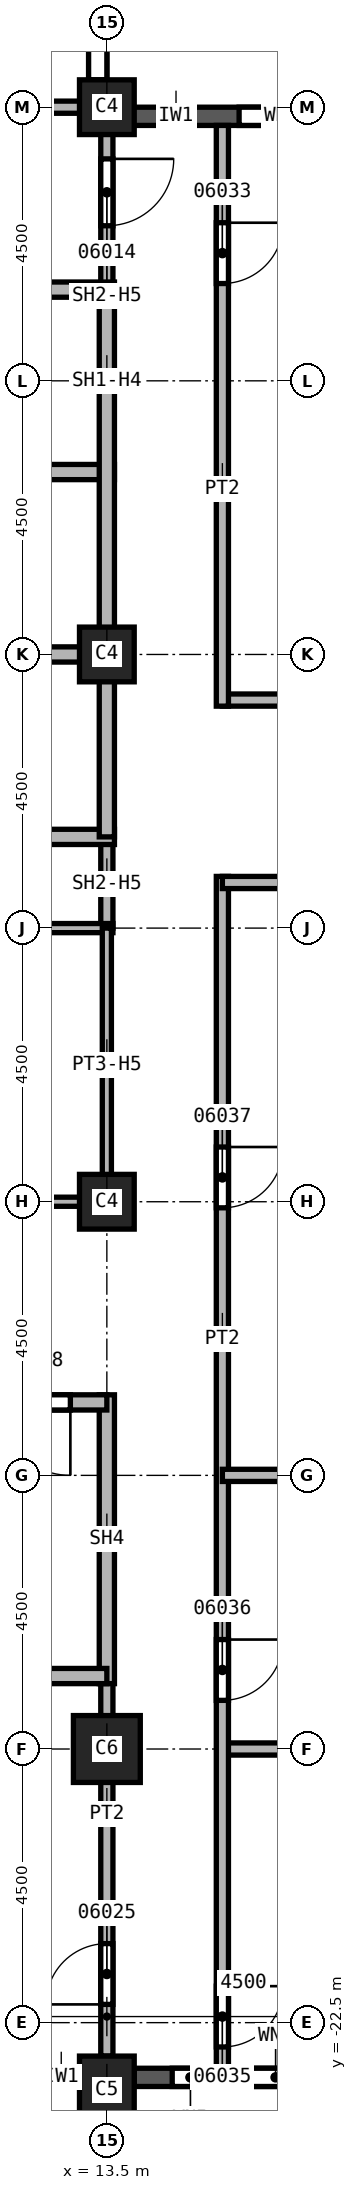
"""IFC4 building model, lengths in metres.
Left out: names, types, materials, properties, quantities, classifications, styles, units other than length and angle.
Written with IfcOpenShell. Run it as: python <this file> out.ifc"""

import sys

from ifc_helpers import new_model, si_unit, direction, frame, frame_2d, origin, origin_2d, place, context, subcontext, project, spatial, rectangle, extrude, element, fill, save


model = new_model("IFC4")
c1 = context("Model", 3, precision=1e-05, world=origin(), true_north=direction((0.0, 1.0)))
c2 = subcontext(c1, "Body", "Model", "MODEL_VIEW")
j1 = project(units=[si_unit("LENGTHUNIT", "METRE"), si_unit("PLANEANGLEUNIT", "RADIAN")], contexts=[c1])
p1 = place(None, origin())
s1 = spatial("IfcSite", under=j1, at=p1, CompositionType="ELEMENT")
p2 = place(p1, origin())
s2 = spatial("IfcBuilding", under=s1, at=p2, CompositionType="ELEMENT")
p3 = place(p2, frame((0.0, 0.0, 126.0)))
s3 = spatial("IfcBuildingStorey", under=s2, at=p3, CompositionType="ELEMENT", Elevation=126.0)
p4 = place(p3, frame((13.5, -18.0, 0.0), z_axis=(0.0, 0.0, 1.0), x_axis=(1.0, 0.0, 0.0)))
e1 = element("IfcColumn", 1, at=p4, inside=s3, PredefinedType="COLUMN", context=c2, shape_type="SweptSolid", body=[
    extrude(rectangle(XDim=1.1, YDim=1.1, at=origin_2d()), origin(), (0.0, 0.0, 1.0), 3.7),
])
for number, where, z_axis, x_axis in (
    (2, (13.5, 0.0, 0.0), (0.0, 0.0, 1.0), (1.0, 0.0, 0.0)),
    (3, (13.5, 9.0, 0.0), (0.0, 0.0, 1.0), (1.0, 0.0, 0.0)),
    (4, (13.5, -9.0, 0.0), (0.0, 0.0, 1.0), (1.0, 0.0, 0.0)),
):
    element("IfcColumn", number, at=place(p3, frame(where, z_axis=z_axis, x_axis=x_axis)), inside=s3, PredefinedType="COLUMN", context=c2, shape_type="SweptSolid", body=[
        extrude(rectangle(XDim=0.9, YDim=0.9, at=origin_2d()), origin(), (0.0, 0.0, 1.0), 3.7),
    ])
p5 = place(p3, frame((13.5, -23.6, 0.0), z_axis=(0.0, 0.0, 1.0), x_axis=(1.0, 0.0, 0.0)))
e5 = element("IfcColumn", 5, at=p5, inside=s3, PredefinedType="COLUMN", context=c2, shape_type="SweptSolid", body=[
    extrude(rectangle(XDim=0.9, YDim=1.1, at=origin_2d()), origin(), (0.0, 0.0, 1.0), 3.7),
])
p6 = place(p3, frame((9.45, -23.4, 0.0), z_axis=(0.0, 0.0, 1.0), x_axis=(1.0, 0.0, 0.0)))
e6 = element("IfcWall", 6, at=p6, inside=s3, PredefinedType="SOLIDWALL", context=c2, shape_type="SweptSolid", body=[
    extrude(rectangle(XDim=3.6, YDim=0.3, at=frame_2d((1.8, 0.0))), origin(), (0.0, 0.0, 1.0), 3.1),
])
p7 = place(p6, frame((0.6, 0.0, 0.8)))
e7 = element("IfcOpeningElement", 7, at=p7, cuts=e6, PredefinedType="OPENING", context=c2, shape_type="SweptSolid", body=[
    extrude(rectangle(XDim=2.4, YDim=1.95, at=frame_2d((1.2, 0.975))), frame((0.0, 0.15, 0.0), z_axis=(0.0, -1.0, 0.0), x_axis=(1.0, 0.0, 0.0)), (0.0, 0.0, 1.0), 0.3),
])
p8 = place(p3, frame((13.95, -23.4, 0.0), z_axis=(0.0, 0.0, 1.0), x_axis=(1.0, 0.0, 0.0)))
e8 = element("IfcWall", 8, at=p8, inside=s3, PredefinedType="SOLIDWALL", context=c2, shape_type="SweptSolid", body=[
    extrude(rectangle(XDim=3.6, YDim=0.3, at=frame_2d((1.8, 0.0))), origin(), (0.0, 0.0, 1.0), 3.1),
])
p9 = place(p8, frame((0.625, 0.0, 0.8)))
e9 = element("IfcOpeningElement", 9, at=p9, cuts=e8, PredefinedType="OPENING", context=c2, shape_type="SweptSolid", body=[
    extrude(rectangle(XDim=0.6, YDim=1.95, at=frame_2d((0.3, 0.975))), frame((0.0, 0.15, 0.0), z_axis=(0.0, -1.0, 0.0), x_axis=(1.0, 0.0, 0.0)), (0.0, 0.0, 1.0), 0.3),
])
p10 = place(p8, frame((1.825, 0.0, 0.8)))
e10 = element("IfcOpeningElement", 10, at=p10, cuts=e8, PredefinedType="OPENING", context=c2, shape_type="SweptSolid", body=[
    extrude(rectangle(XDim=1.0, YDim=1.95, at=frame_2d((0.5, 0.975))), frame((0.0, 0.15, 0.0), z_axis=(0.0, -1.0, 0.0), x_axis=(1.0, 0.0, 0.0)), (0.0, 0.0, 1.0), 0.3),
])
p11 = place(p3, frame((13.35, 9.05, 0.0), z_axis=(0.0, 0.0, 1.0), x_axis=(0.0, 1.0, 0.0)))
e11 = element("IfcWall", 11, at=p11, inside=s3, PredefinedType="SOLIDWALL", context=c2, shape_type="SweptSolid", body=[
    extrude(rectangle(XDim=8.4, YDim=0.3, at=frame_2d((4.2, 0.0))), origin(), (0.0, 0.0, 1.0), 3.1),
])
p12 = place(p11, frame((0.4, 0.0, 0.8)))
e12 = element("IfcOpeningElement", 12, at=p12, cuts=e11, PredefinedType="OPENING", context=c2, shape_type="SweptSolid", body=[
    extrude(rectangle(XDim=2.4, YDim=1.95, at=frame_2d((1.2, 0.975))), frame((0.0, 0.15, 0.0), z_axis=(0.0, -1.0, 0.0), x_axis=(1.0, 0.0, 0.0)), (0.0, 0.0, 1.0), 0.3),
])
p13 = place(p11, frame((4.4, 0.0, 0.8)))
e13 = element("IfcOpeningElement", 13, at=p13, cuts=e11, PredefinedType="OPENING", context=c2, shape_type="SweptSolid", body=[
    extrude(rectangle(XDim=2.4, YDim=1.95, at=frame_2d((1.2, 0.975))), frame((0.0, 0.15, 0.0), z_axis=(0.0, -1.0, 0.0), x_axis=(1.0, 0.0, 0.0)), (0.0, 0.0, 1.0), 0.3),
])
p14 = place(p3, frame((21.95, 8.85, 0.0), z_axis=(0.0, 0.0, 1.0), x_axis=(-1.0, 0.0, 0.0)))
e14 = element("IfcWall", 14, at=p14, inside=s3, PredefinedType="SOLIDWALL", context=c2, shape_type="SweptSolid", body=[
    extrude(rectangle(XDim=8.4, YDim=0.3, at=frame_2d((4.2, 0.0))), origin(), (0.0, 0.0, 1.0), 3.1),
])
p15 = place(p14, frame((1.65, 0.0, 0.8)))
e15 = element("IfcOpeningElement", 15, at=p15, cuts=e14, PredefinedType="OPENING", context=c2, shape_type="SweptSolid", body=[
    extrude(rectangle(XDim=1.4, YDim=1.95, at=frame_2d((0.7, 0.975))), frame((0.0, 0.15, 0.0), z_axis=(0.0, -1.0, 0.0), x_axis=(1.0, 0.0, 0.0)), (0.0, 0.0, 1.0), 0.3),
])
p16 = place(p14, frame((4.875, 0.0, 0.8)))
e16 = element("IfcOpeningElement", 16, at=p16, cuts=e14, PredefinedType="OPENING", context=c2, shape_type="SweptSolid", body=[
    extrude(rectangle(XDim=1.4, YDim=1.95, at=frame_2d((0.7, 0.975))), frame((0.0, 0.15, 0.0), z_axis=(0.0, -1.0, 0.0), x_axis=(1.0, 0.0, 0.0)), (0.0, 0.0, 1.0), 0.3),
])
p17 = place(p3, frame((13.5, -23.05, 0.0), z_axis=(0.0, 0.0, 1.0), x_axis=(0.0, 1.0, 0.0)))
e17 = element("IfcWall", 17, at=p17, inside=s3, PredefinedType="PARTITIONING", context=c2, shape_type="SweptSolid", body=[
    extrude(rectangle(XDim=6.375, YDim=0.2, at=frame_2d((3.188, 0.0))), origin(), (0.0, 0.0, 1.0), 3.7),
])
p18 = place(p17, frame((0.85, 0.0, 0.0)))
e18 = element("IfcOpeningElement", 18, at=p18, cuts=e17, PredefinedType="OPENING", context=c2, shape_type="SweptSolid", body=[
    extrude(rectangle(XDim=1.0, YDim=2.1, at=frame_2d((0.5, 1.05))), frame((0.0, 0.1, 0.0), z_axis=(0.0, -1.0, 0.0), x_axis=(1.0, 0.0, 0.0)), (0.0, 0.0, 1.0), 0.2),
])
p19 = place(p3, frame((15.4, -18.0, 0.0), z_axis=(0.0, 0.0, 1.0), x_axis=(1.0, 0.0, 0.0)))
e19 = element("IfcWall", 19, at=p19, inside=s3, PredefinedType="PARTITIONING", context=c2, shape_type="SweptSolid", body=[
    extrude(rectangle(XDim=8.8, YDim=0.2, at=frame_2d((4.4, 0.0))), origin(), (0.0, 0.0, 1.0), 3.7),
])
p20 = place(p3, frame((15.4, -3.65, 0.0), z_axis=(0.0, 0.0, 1.0), x_axis=(0.0, -1.0, 0.0)))
e20 = element("IfcWall", 20, at=p20, inside=s3, PredefinedType="PARTITIONING", context=c2, shape_type="SweptSolid", body=[
    extrude(rectangle(XDim=19.6, YDim=0.2, at=frame_2d((9.8, 0.0))), origin(), (0.0, 0.0, 1.0), 3.7),
])
p21 = place(p20, frame((18.25, 0.0, 0.0)))
e21 = element("IfcOpeningElement", 21, at=p21, cuts=e20, PredefinedType="OPENING", context=c2, shape_type="SweptSolid", body=[
    extrude(rectangle(XDim=1.0, YDim=2.1, at=frame_2d((0.5, 1.05))), frame((0.0, 0.1, 0.0), z_axis=(0.0, -1.0, 0.0), x_axis=(1.0, 0.0, 0.0)), (0.0, 0.0, 1.0), 0.2),
])
p22 = place(p20, frame((12.55, 0.0, 0.0)))
e22 = element("IfcOpeningElement", 22, at=p22, cuts=e20, PredefinedType="OPENING", context=c2, shape_type="SweptSolid", body=[
    extrude(rectangle(XDim=1.0, YDim=2.1, at=frame_2d((0.5, 1.05))), frame((0.0, 0.1, 0.0), z_axis=(0.0, -1.0, 0.0), x_axis=(1.0, 0.0, 0.0)), (0.0, 0.0, 1.0), 0.2),
])
p23 = place(p20, frame((4.45, 0.0, 0.0)))
e23 = element("IfcOpeningElement", 23, at=p23, cuts=e20, PredefinedType="OPENING", context=c2, shape_type="SweptSolid", body=[
    extrude(rectangle(XDim=1.0, YDim=2.1, at=frame_2d((0.5, 1.05))), frame((0.0, 0.1, 0.0), z_axis=(0.0, -1.0, 0.0), x_axis=(1.0, 0.0, 0.0)), (0.0, 0.0, 1.0), 0.2),
])
p24 = place(p3, frame((15.4, -13.5, 0.0), z_axis=(0.0, 0.0, 1.0), x_axis=(1.0, 0.0, 0.0)))
e24 = element("IfcWall", 24, at=p24, inside=s3, PredefinedType="PARTITIONING", context=c2, shape_type="SweptSolid", body=[
    extrude(rectangle(XDim=11.7, YDim=0.2, at=frame_2d((5.85, 0.0))), origin(), (0.0, 0.0, 1.0), 3.7),
])
p25 = place(p3, frame((15.4, -0.75, 0.0), z_axis=(0.0, 0.0, 1.0), x_axis=(1.0, 0.0, 0.0)))
e25 = element("IfcWall", 25, at=p25, inside=s3, PredefinedType="PARTITIONING", context=c2, shape_type="SweptSolid", body=[
    extrude(rectangle(XDim=18.45, YDim=0.2, at=frame_2d((9.225, 0.0))), origin(), (0.0, 0.0, 1.0), 3.7),
])
p26 = place(p25, frame((14.9, 0.0, 0.0)))
e26 = element("IfcOpeningElement", 26, at=p26, cuts=e25, PredefinedType="OPENING", context=c2, shape_type="SweptSolid", body=[
    extrude(rectangle(XDim=1.0, YDim=2.1, at=frame_2d((0.5, 1.05))), frame((0.0, 0.1, 0.0), z_axis=(0.0, -1.0, 0.0), x_axis=(1.0, 0.0, 0.0)), (0.0, 0.0, 1.0), 0.2),
])
p27 = place(p3, frame((15.4, 8.7, 0.0), z_axis=(0.0, 0.0, 1.0), x_axis=(0.0, -1.0, 0.0)))
e27 = element("IfcWall", 27, at=p27, inside=s3, PredefinedType="PARTITIONING", context=c2, shape_type="SweptSolid", body=[
    extrude(rectangle(XDim=9.55, YDim=0.2, at=frame_2d((4.775, 0.0))), origin(), (0.0, 0.0, 1.0), 3.7),
])
p28 = place(p27, frame((1.6, 0.0, 0.0)))
e28 = element("IfcOpeningElement", 28, at=p28, cuts=e27, PredefinedType="OPENING", context=c2, shape_type="SweptSolid", body=[
    extrude(rectangle(XDim=1.0, YDim=2.1, at=frame_2d((0.5, 1.05))), frame((0.0, 0.1, 0.0), z_axis=(0.0, -1.0, 0.0), x_axis=(1.0, 0.0, 0.0)), (0.0, 0.0, 1.0), 0.2),
])
p29 = place(p3, frame((33.85, -3.75, 0.0), z_axis=(0.0, 0.0, 1.0), x_axis=(-1.0, 0.0, 0.0)))
e29 = element("IfcWall", 29, at=p29, inside=s3, PredefinedType="PARTITIONING", context=c2, shape_type="SweptSolid", body=[
    extrude(rectangle(XDim=18.45, YDim=0.2, at=frame_2d((9.225, 0.0))), origin(), (0.0, 0.0, 1.0), 3.7),
])
p30 = place(p3, frame((10.5, 9.0, 0.0), z_axis=(0.0, 0.0, 1.0), x_axis=(1.0, 0.0, 0.0)))
e30 = element("IfcWall", 30, at=p30, inside=s3, PredefinedType="SOLIDWALL", context=c2, shape_type="SweptSolid", body=[
    extrude(rectangle(XDim=3.0, YDim=0.2, at=frame_2d((1.5, 0.0))), origin(), (0.0, 0.0, 1.0), 2.938),
])
p31 = place(p3, frame((13.5, -3.0, 0.0), z_axis=(0.0, 0.0, 1.0), x_axis=(0.0, -1.0, 0.0)))
e31 = element("IfcWall", 31, at=p31, inside=s3, PredefinedType="SOLIDWALL", context=c2, shape_type="SweptSolid", body=[
    extrude(rectangle(XDim=1.5, YDim=0.2, at=frame_2d((0.75, 0.0))), origin(), (0.0, 0.0, 1.0), 2.938),
])
p32 = place(p3, frame((13.5, 9.05, 0.0), z_axis=(0.0, 0.0, 1.0), x_axis=(0.0, -1.0, 0.0)))
e32 = element("IfcWall", 32, at=p32, inside=s3, PredefinedType="SOLIDWALL", context=c2, shape_type="SweptSolid", body=[
    extrude(rectangle(XDim=3.05, YDim=0.2, at=frame_2d((1.525, 0.0))), origin(), (0.0, 0.0, 1.0), 2.938),
])
p33 = place(p32, frame((0.9, 0.0, 0.0)))
e33 = element("IfcOpeningElement", 33, at=p33, cuts=e32, PredefinedType="OPENING", context=c2, shape_type="SweptSolid", body=[
    extrude(rectangle(XDim=1.1, YDim=2.1, at=frame_2d((0.55, 1.05))), frame((0.0, 0.1, 0.0), z_axis=(0.0, -1.0, 0.0), x_axis=(1.0, 0.0, 0.0)), (0.0, 0.0, 1.0), 0.2),
])
p34 = place(p3, frame((4.375, 3.0, 0.0), z_axis=(0.0, 0.0, 1.0), x_axis=(1.0, 0.0, 0.0)))
e34 = element("IfcWall", 34, at=p34, inside=s3, PredefinedType="SOLIDWALL", context=c2, shape_type="SweptSolid", body=[
    extrude(rectangle(XDim=9.25, YDim=0.25, at=frame_2d((4.625, 0.0))), origin(), (0.0, 0.0, 1.0), 3.7),
])
p35 = place(p34, frame((3.375, 0.0, 0.0)))
e35 = element("IfcOpeningElement", 35, at=p35, cuts=e34, PredefinedType="OPENING", context=c2, shape_type="SweptSolid", body=[
    extrude(rectangle(XDim=1.1, YDim=2.1, at=frame_2d((0.55, 1.05))), frame((0.0, 0.125, 0.0), z_axis=(0.0, -1.0, 0.0), x_axis=(1.0, 0.0, 0.0)), (0.0, 0.0, 1.0), 0.25),
])
p36 = place(p3, frame((7.5, -3.0, 0.0), z_axis=(0.0, 0.0, 1.0), x_axis=(1.0, 0.0, 0.0)))
e36 = element("IfcWall", 36, at=p36, inside=s3, PredefinedType="SOLIDWALL", context=c2, shape_type="SweptSolid", body=[
    extrude(rectangle(XDim=6.125, YDim=0.25, at=frame_2d((3.062, 0.0))), origin(), (0.0, 0.0, 1.0), 3.7),
])
p37 = place(p36, frame((0.25, 0.0, 0.0)))
e37 = element("IfcOpeningElement", 37, at=p37, cuts=e36, PredefinedType="OPENING", context=c2, shape_type="SweptSolid", body=[
    extrude(rectangle(XDim=1.1, YDim=2.1, at=frame_2d((0.55, 1.05))), frame((0.0, 0.125, 0.0), z_axis=(0.0, -1.0, 0.0), x_axis=(1.0, 0.0, 0.0)), (0.0, 0.0, 1.0), 0.25),
])
for number, where, z_axis, x_axis in (
    (38, (10.5, 0.0, 0.0), (0.0, 0.0, 1.0), (1.0, 0.0, 0.0)),
    (39, (10.5, 6.0, 0.0), (0.0, 0.0, 1.0), (1.0, 0.0, 0.0)),
):
    element("IfcWall", number, at=place(p3, frame(where, z_axis=z_axis, x_axis=x_axis)), inside=s3, PredefinedType="SOLIDWALL", context=c2, shape_type="SweptSolid", body=[
        extrude(rectangle(XDim=3.125, YDim=0.25, at=frame_2d((1.562, 0.0))), origin(), (0.0, 0.0, 1.0), 3.7),
    ])
p38 = place(p3, frame((13.5, 6.0, 0.0), z_axis=(0.0, 0.0, 1.0), x_axis=(0.0, -1.0, 0.0)))
e40 = element("IfcWall", 40, at=p38, inside=s3, PredefinedType="SOLIDWALL", context=c2, shape_type="SweptSolid", body=[
    extrude(rectangle(XDim=9.0, YDim=0.25, at=frame_2d((4.5, 0.0))), origin(), (0.0, 0.0, 1.0), 2.938),
])
p39 = place(p3, frame((13.5, -16.925, 0.0), z_axis=(0.0, 0.0, 1.0), x_axis=(0.0, 1.0, 0.0)))
e41 = element("IfcWall", 41, at=p39, inside=s3, PredefinedType="SOLIDWALL", context=c2, shape_type="SweptSolid", body=[
    extrude(rectangle(XDim=4.75, YDim=0.25, at=frame_2d((2.375, 0.0))), origin(), (0.0, 0.0, 1.0), 3.7),
])
p40 = place(p3, frame((13.5, -16.8, 0.0), z_axis=(0.0, 0.0, 1.0), x_axis=(-1.0, 0.0, 0.0)))
e42 = element("IfcWall", 42, at=p40, inside=s3, PredefinedType="SOLIDWALL", context=c2, shape_type="SweptSolid", body=[
    extrude(rectangle(XDim=9.125, YDim=0.25, at=frame_2d((4.562, 0.0))), origin(), (0.0, 0.0, 1.0), 3.7),
])
p41 = place(p3, frame((13.5, -12.3, 0.0), z_axis=(0.0, 0.0, 1.0), x_axis=(-1.0, 0.0, 0.0)))
e43 = element("IfcWall", 43, at=p41, inside=s3, PredefinedType="SOLIDWALL", context=c2, shape_type="SweptSolid", body=[
    extrude(rectangle(XDim=9.125, YDim=0.25, at=frame_2d((4.562, 0.0))), origin(), (0.0, 0.0, 1.0), 3.7),
])
p42 = place(p41, frame((0.6, 0.0, 0.0)))
e44 = element("IfcOpeningElement", 44, at=p42, cuts=e43, PredefinedType="OPENING", context=c2, shape_type="SweptSolid", body=[
    extrude(rectangle(XDim=1.2, YDim=2.1, at=frame_2d((0.6, 1.05))), frame((0.0, 0.125, 0.0), z_axis=(0.0, -1.0, 0.0), x_axis=(1.0, 0.0, 0.0)), (0.0, 0.0, 1.0), 0.25),
])
p43 = place(p3, frame((10.5, -4.5, 0.0), z_axis=(0.0, 0.0, 1.0), x_axis=(1.0, 0.0, 0.0)))
e45 = element("IfcWall", 45, at=p43, inside=s3, PredefinedType="PARTITIONING", context=c2, shape_type="SweptSolid", body=[
    extrude(rectangle(XDim=3.1, YDim=0.15, at=frame_2d((1.55, 0.0))), origin(), (0.0, 0.0, 1.0), 3.7),
])
p44 = place(p3, frame((13.5, -9.0, 0.0), z_axis=(0.0, 0.0, 1.0), x_axis=(-1.0, 0.0, 0.0)))
e46 = element("IfcWall", 46, at=p44, inside=s3, PredefinedType="PARTITIONING", context=c2, shape_type="SweptSolid", body=[
    extrude(rectangle(XDim=3.0, YDim=0.15, at=frame_2d((1.5, 0.0))), origin(), (0.0, 0.0, 1.0), 2.938),
])
p45 = place(p3, frame((13.5, -4.5, 0.0), z_axis=(0.0, 0.0, 1.0), x_axis=(0.0, -1.0, 0.0)))
e47 = element("IfcWall", 47, at=p45, inside=s3, PredefinedType="PARTITIONING", context=c2, shape_type="SweptSolid", body=[
    extrude(rectangle(XDim=4.575, YDim=0.15, at=frame_2d((2.288, 0.0))), origin(), (0.0, 0.0, 1.0), 2.938),
])
p46 = place(p12, origin())
e48 = element("IfcWindow", 48, at=p46, inside=s3, PartitioningType="SINGLE_PANEL", PredefinedType="WINDOW", context=c2, shape_type="SweptSolid", body=[
    extrude(rectangle(XDim=2.4, YDim=1.95, at=frame_2d((1.2, 0.975))), frame((0.0, 0.03, 0.0), z_axis=(0.0, -1.0, 0.0), x_axis=(1.0, 0.0, 0.0)), (0.0, 0.0, 1.0), 0.06),
])
fill(e12, e48)
p47 = place(p33, origin())
e49 = element("IfcDoor", 49, at=p47, inside=s3, OperationType="SINGLE_SWING_LEFT", PredefinedType="DOOR", context=c2, shape_type="SweptSolid", body=[
    extrude(rectangle(XDim=1.1, YDim=2.1, at=frame_2d((0.55, 1.05))), frame((0.0, 0.025, 0.0), z_axis=(0.0, -1.0, 0.0), x_axis=(1.0, 0.0, 0.0)), (0.0, 0.0, 1.0), 0.05),
])
fill(e33, e49)
p48 = place(p42, origin())
e50 = element("IfcDoor", 50, at=p48, inside=s3, OperationType="SINGLE_SWING_LEFT", PredefinedType="DOOR", context=c2, shape_type="SweptSolid", body=[
    extrude(rectangle(XDim=1.2, YDim=2.1, at=frame_2d((0.6, 1.05))), frame((0.0, 0.025, 0.0), z_axis=(0.0, -1.0, 0.0), x_axis=(1.0, 0.0, 0.0)), (0.0, 0.0, 1.0), 0.05),
])
fill(e44, e50)
p49 = place(p18, origin())
e51 = element("IfcDoor", 51, at=p49, inside=s3, OperationType="SINGLE_SWING_RIGHT", PredefinedType="DOOR", context=c2, shape_type="SweptSolid", body=[
    extrude(rectangle(XDim=1.0, YDim=2.1, at=frame_2d((0.5, 1.05))), frame((0.0, 0.025, 0.0), z_axis=(0.0, -1.0, 0.0), x_axis=(1.0, 0.0, 0.0)), (0.0, 0.0, 1.0), 0.05),
])
fill(e18, e51)
p50 = place(p28, origin())
e52 = element("IfcDoor", 52, at=p50, inside=s3, OperationType="SINGLE_SWING_RIGHT", PredefinedType="DOOR", context=c2, shape_type="SweptSolid", body=[
    extrude(rectangle(XDim=1.0, YDim=2.1, at=frame_2d((0.5, 1.05))), frame((0.0, 0.025, 0.0), z_axis=(0.0, -1.0, 0.0), x_axis=(1.0, 0.0, 0.0)), (0.0, 0.0, 1.0), 0.05),
])
fill(e28, e52)
p51 = place(p21, origin())
e53 = element("IfcDoor", 53, at=p51, inside=s3, OperationType="SINGLE_SWING_RIGHT", PredefinedType="DOOR", context=c2, shape_type="SweptSolid", body=[
    extrude(rectangle(XDim=1.0, YDim=2.1, at=frame_2d((0.5, 1.05))), frame((0.0, 0.025, 0.0), z_axis=(0.0, -1.0, 0.0), x_axis=(1.0, 0.0, 0.0)), (0.0, 0.0, 1.0), 0.05),
])
fill(e21, e53)
p52 = place(p22, origin())
e54 = element("IfcDoor", 54, at=p52, inside=s3, OperationType="SINGLE_SWING_LEFT", PredefinedType="DOOR", context=c2, shape_type="SweptSolid", body=[
    extrude(rectangle(XDim=1.0, YDim=2.1, at=frame_2d((0.5, 1.05))), frame((0.0, 0.025, 0.0), z_axis=(0.0, -1.0, 0.0), x_axis=(1.0, 0.0, 0.0)), (0.0, 0.0, 1.0), 0.05),
])
fill(e22, e54)
p53 = place(p23, origin())
e55 = element("IfcDoor", 55, at=p53, inside=s3, OperationType="SINGLE_SWING_RIGHT", PredefinedType="DOOR", context=c2, shape_type="SweptSolid", body=[
    extrude(rectangle(XDim=1.0, YDim=2.1, at=frame_2d((0.5, 1.05))), frame((0.0, 0.025, 0.0), z_axis=(0.0, -1.0, 0.0), x_axis=(1.0, 0.0, 0.0)), (0.0, 0.0, 1.0), 0.05),
])
fill(e23, e55)
p54 = place(p9, origin())
e56 = element("IfcWindow", 56, at=p54, inside=s3, PartitioningType="SINGLE_PANEL", PredefinedType="WINDOW", context=c2, shape_type="SweptSolid", body=[
    extrude(rectangle(XDim=0.6, YDim=1.95, at=frame_2d((0.3, 0.975))), frame((0.0, 0.03, 0.0), z_axis=(0.0, -1.0, 0.0), x_axis=(1.0, 0.0, 0.0)), (0.0, 0.0, 1.0), 0.06),
])
fill(e9, e56)
p55 = place(p10, origin())
e57 = element("IfcWindow", 57, at=p55, inside=s3, PartitioningType="SINGLE_PANEL", PredefinedType="WINDOW", context=c2, shape_type="SweptSolid", body=[
    extrude(rectangle(XDim=1.0, YDim=1.95, at=frame_2d((0.5, 0.975))), frame((0.0, 0.03, 0.0), z_axis=(0.0, -1.0, 0.0), x_axis=(1.0, 0.0, 0.0)), (0.0, 0.0, 1.0), 0.06),
])
fill(e10, e57)
p56 = place(p16, origin())
e58 = element("IfcWindow", 58, at=p56, inside=s3, PartitioningType="SINGLE_PANEL", PredefinedType="WINDOW", context=c2, shape_type="SweptSolid", body=[
    extrude(rectangle(XDim=1.4, YDim=1.95, at=frame_2d((0.7, 0.975))), frame((0.0, 0.03, 0.0), z_axis=(0.0, -1.0, 0.0), x_axis=(1.0, 0.0, 0.0)), (0.0, 0.0, 1.0), 0.06),
])
fill(e16, e58)
save(model, sys.argv[1])
